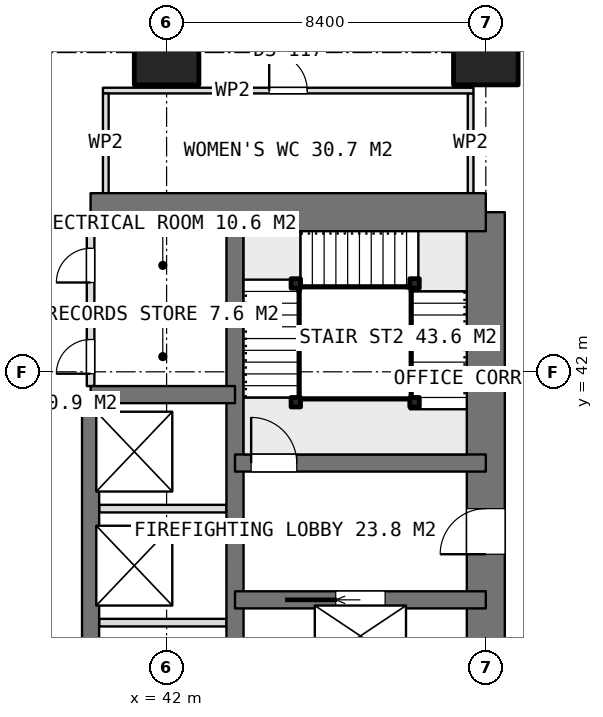
"""IFC4 building model, lengths in metres.
Left out: names, types, materials, properties, quantities, classifications, styles, units other than length and angle.
Written with IfcOpenShell. Run it as: python <this file> out.ifc"""

import sys

from ifc_helpers import new_model, si_unit, direction, frame, frame_2d, origin, origin_2d, place, context, subcontext, project, spatial, rectangle, extrude, element, fill, save


model = new_model("IFC4")
c1 = context("Model", 3, precision=1e-05, world=origin(), true_north=direction((0.0, 1.0)))
c2 = subcontext(c1, "Body", "Model", "MODEL_VIEW")
j1 = project(units=[si_unit("LENGTHUNIT", "METRE"), si_unit("PLANEANGLEUNIT", "RADIAN")], contexts=[c1])
p1 = place(None, origin())
s1 = spatial("IfcSite", under=j1, at=p1, CompositionType="ELEMENT")
p2 = place(p1, origin())
s2 = spatial("IfcBuilding", under=s1, at=p2, CompositionType="ELEMENT")
p3 = place(p2, frame((0.0, 0.0, 110.3)))
s3 = spatial("IfcBuildingStorey", under=s2, at=p3, CompositionType="ELEMENT", Elevation=110.3)
p4 = place(p3, frame((40.0, 46.2, 0.0), z_axis=(0.0, 0.0, 1.0), x_axis=(1.0, 0.0, 0.0)))
e1 = element("IfcWall", 1, at=p4, inside=s3, PredefinedType="SHEAR", context=c2, shape_type="SweptSolid", body=[
    extrude(rectangle(XDim=10.4, YDim=1.0, at=frame_2d((5.2, 0.0))), origin(), (0.0, 0.0, 1.0), 3.75),
])
p5 = place(p3, frame((50.4, 21.0, 0.0), z_axis=(0.0, 0.0, 1.0), x_axis=(0.0, 1.0, 0.0)))
e2 = element("IfcWall", 2, at=p5, inside=s3, PredefinedType="SHEAR", context=c2, shape_type="SweptSolid", body=[
    extrude(rectangle(XDim=25.2, YDim=1.0, at=frame_2d((12.6, 0.0))), origin(), (0.0, 0.0, 1.0), 3.75),
])
p6 = place(p5, frame((16.2, 0.0, 0.0)))
e3 = element("IfcOpeningElement", 3, at=p6, cuts=e2, PredefinedType="OPENING", context=c2, shape_type="SweptSolid", body=[
    extrude(rectangle(XDim=1.2, YDim=2.1, at=frame_2d((0.6, 1.05))), frame((0.0, 0.51, 0.0), z_axis=(0.0, -1.0, 0.0), x_axis=(1.0, 0.0, 0.0)), (0.0, 0.0, 1.0), 1.02),
])
p7 = place(p5, frame((10.05, 0.0, 0.0)))
e4 = element("IfcOpeningElement", 4, at=p7, cuts=e2, PredefinedType="OPENING", context=c2, shape_type="SweptSolid", body=[
    extrude(rectangle(XDim=0.9, YDim=2.1, at=frame_2d((0.45, 1.05))), frame((0.0, 0.51, 0.0), z_axis=(0.0, -1.0, 0.0), x_axis=(1.0, 0.0, 0.0)), (0.0, 0.0, 1.0), 1.02),
])
p8 = place(p5, frame((7.45, 0.0, 0.0)))
e5 = element("IfcOpeningElement", 5, at=p8, cuts=e2, PredefinedType="OPENING", context=c2, shape_type="SweptSolid", body=[
    extrude(rectangle(XDim=0.9, YDim=2.1, at=frame_2d((0.45, 1.05))), frame((0.0, 0.51, 0.0), z_axis=(0.0, -1.0, 0.0), x_axis=(1.0, 0.0, 0.0)), (0.0, 0.0, 1.0), 1.02),
])
p9 = place(p5, frame((0.7, 0.0, 0.0)))
e6 = element("IfcOpeningElement", 6, at=p9, cuts=e2, PredefinedType="OPENING", context=c2, shape_type="SweptSolid", body=[
    extrude(rectangle(XDim=1.2, YDim=2.1, at=frame_2d((0.6, 1.05))), frame((0.0, 0.51, 0.0), z_axis=(0.0, -1.0, 0.0), x_axis=(1.0, 0.0, 0.0)), (0.0, 0.0, 1.0), 1.02),
])
p10 = place(p3, frame((43.8, 21.0, 0.0), z_axis=(0.0, 0.0, 1.0), x_axis=(0.0, 1.0, 0.0)))
e7 = element("IfcWall", 7, at=p10, inside=s3, PredefinedType="SHEAR", context=c2, shape_type="SweptSolid", body=[
    extrude(rectangle(XDim=25.2, YDim=0.45, at=frame_2d((12.6, 0.0))), origin(), (0.0, 0.0, 1.0), 3.75),
])
p11 = place(p3, frame((40.0, 23.4, 0.0), z_axis=(0.0, 0.0, 1.0), x_axis=(0.0, 1.0, 0.0)))
e8 = element("IfcWall", 8, at=p11, inside=s3, PredefinedType="SHEAR", context=c2, shape_type="SweptSolid", body=[
    extrude(rectangle(XDim=18.0, YDim=0.45, at=frame_2d((9.0, 0.0))), origin(), (0.0, 0.0, 1.0), 3.75),
])
p12 = place(p11, frame((1.7, 0.0, 0.0)))
e9 = element("IfcOpeningElement", 9, at=p12, cuts=e8, PredefinedType="OPENING", context=c2, shape_type="SweptSolid", body=[
    extrude(rectangle(XDim=1.0, YDim=2.1, at=frame_2d((0.5, 1.05))), frame((0.0, 0.235, 0.0), z_axis=(0.0, -1.0, 0.0), x_axis=(1.0, 0.0, 0.0)), (0.0, 0.0, 1.0), 0.47),
])
p13 = place(p11, frame((4.75, 0.0, 0.0)))
e10 = element("IfcOpeningElement", 10, at=p13, cuts=e8, PredefinedType="OPENING", context=c2, shape_type="SweptSolid", body=[
    extrude(rectangle(XDim=0.9, YDim=2.1, at=frame_2d((0.45, 1.05))), frame((0.0, 0.235, 0.0), z_axis=(0.0, -1.0, 0.0), x_axis=(1.0, 0.0, 0.0)), (0.0, 0.0, 1.0), 0.47),
])
p14 = place(p3, frame((40.0, 41.4, 0.0), z_axis=(0.0, 0.0, 1.0), x_axis=(1.0, 0.0, 0.0)))
e11 = element("IfcWall", 11, at=p14, inside=s3, PredefinedType="SHEAR", context=c2, shape_type="SweptSolid", body=[
    extrude(rectangle(XDim=3.8, YDim=0.45, at=frame_2d((1.9, 0.0))), origin(), (0.0, 0.0, 1.0), 3.75),
])
p15 = place(p3, frame((43.8, 36.0, 0.0), z_axis=(0.0, 0.0, 1.0), x_axis=(1.0, 0.0, 0.0)))
e12 = element("IfcWall", 12, at=p15, inside=s3, PredefinedType="SHEAR", context=c2, shape_type="SweptSolid", body=[
    extrude(rectangle(XDim=6.6, YDim=0.45, at=frame_2d((3.3, 0.0))), origin(), (0.0, 0.0, 1.0), 3.75),
])
p16 = place(p15, frame((2.65, 0.0, 0.0)))
e13 = element("IfcOpeningElement", 13, at=p16, cuts=e12, PredefinedType="OPENING", context=c2, shape_type="SweptSolid", body=[
    extrude(rectangle(XDim=1.3, YDim=2.1, at=frame_2d((0.65, 1.05))), frame((0.0, 0.235, 0.0), z_axis=(0.0, -1.0, 0.0), x_axis=(1.0, 0.0, 0.0)), (0.0, 0.0, 1.0), 0.47),
])
p17 = place(p3, frame((43.8, 39.6, 0.0), z_axis=(0.0, 0.0, 1.0), x_axis=(1.0, 0.0, 0.0)))
e14 = element("IfcWall", 14, at=p17, inside=s3, PredefinedType="SHEAR", context=c2, shape_type="SweptSolid", body=[
    extrude(rectangle(XDim=6.6, YDim=0.45, at=frame_2d((3.3, 0.0))), origin(), (0.0, 0.0, 1.0), 3.75),
])
p18 = place(p17, frame((0.425, 0.0, 0.0)))
e15 = element("IfcOpeningElement", 15, at=p18, cuts=e14, PredefinedType="OPENING", context=c2, shape_type="SweptSolid", body=[
    extrude(rectangle(XDim=1.2, YDim=2.1, at=frame_2d((0.6, 1.05))), frame((0.0, 0.235, 0.0), z_axis=(0.0, -1.0, 0.0), x_axis=(1.0, 0.0, 0.0)), (0.0, 0.0, 1.0), 0.47),
])
for number, where, z_axis, x_axis in (
    (16, (42.0, 50.4, 0.0), (0.0, 0.0, 1.0), (1.0, 0.0, 0.0)),
    (17, (50.4, 50.4, 0.0), (0.0, 0.0, 1.0), (1.0, 0.0, 0.0)),
):
    element("IfcColumn", number, at=place(p3, frame(where, z_axis=z_axis, x_axis=x_axis)), inside=s3, PredefinedType="COLUMN", context=c2, shape_type="SweptSolid", body=[
        extrude(rectangle(XDim=1.7, YDim=1.7, at=origin_2d()), origin(), (0.0, 0.0, 1.0), 3.75),
    ])
for number, where, z_axis, x_axis in (
    (18, (40.225, 35.4, 0.0), (0.0, 0.0, 1.0), (1.0, 0.0, 0.0)),
    (19, (40.225, 38.4, 0.0), (0.0, 0.0, 1.0), (1.0, 0.0, 0.0)),
):
    element("IfcWall", number, at=place(p3, frame(where, z_axis=z_axis, x_axis=x_axis)), inside=s3, PredefinedType="PARTITIONING", context=c2, shape_type="SweptSolid", body=[
        extrude(rectangle(XDim=3.35, YDim=0.2, at=frame_2d((1.675, 0.0))), origin(), (0.0, 0.0, 1.0), 3.5),
    ])
p19 = place(p3, frame((40.0, 41.625, 0.0), z_axis=(0.0, 0.0, 1.0), x_axis=(0.0, 1.0, 0.0)))
e20 = element("IfcWall", 20, at=p19, inside=s3, PredefinedType="PARTITIONING", context=c2, shape_type="SweptSolid", body=[
    extrude(rectangle(XDim=4.075, YDim=0.2, at=frame_2d((2.038, 0.0))), origin(), (0.0, 0.0, 1.0), 3.5),
])
p20 = place(p19, frame((2.725, 0.0, 0.0)))
e21 = element("IfcOpeningElement", 21, at=p20, cuts=e20, PredefinedType="OPENING", context=c2, shape_type="SweptSolid", body=[
    extrude(rectangle(XDim=0.9, YDim=2.1, at=frame_2d((0.45, 1.05))), frame((0.0, 0.11, 0.0), z_axis=(0.0, -1.0, 0.0), x_axis=(1.0, 0.0, 0.0)), (0.0, 0.0, 1.0), 0.22),
])
p21 = place(p19, frame((0.325, 0.0, 0.0)))
e22 = element("IfcOpeningElement", 22, at=p21, cuts=e20, PredefinedType="OPENING", context=c2, shape_type="SweptSolid", body=[
    extrude(rectangle(XDim=0.9, YDim=2.1, at=frame_2d((0.45, 1.05))), frame((0.0, 0.11, 0.0), z_axis=(0.0, -1.0, 0.0), x_axis=(1.0, 0.0, 0.0)), (0.0, 0.0, 1.0), 0.22),
])
p22 = place(p3, frame((40.0, 43.4, 0.0), z_axis=(0.0, 0.0, 1.0), x_axis=(1.0, 0.0, 0.0)))
e23 = element("IfcWall", 23, at=p22, inside=s3, PredefinedType="PARTITIONING", context=c2, shape_type="SweptSolid", body=[
    extrude(rectangle(XDim=3.575, YDim=0.2, at=frame_2d((1.788, 0.0))), origin(), (0.0, 0.0, 1.0), 3.5),
])
p23 = place(p3, frame((40.325, 49.4, 0.0), z_axis=(0.0, 0.0, 1.0), x_axis=(1.0, 0.0, 0.0)))
e24 = element("IfcWall", 24, at=p23, inside=s3, PredefinedType="PARTITIONING", context=c2, shape_type="SweptSolid", body=[
    extrude(rectangle(XDim=9.75, YDim=0.15, at=frame_2d((4.875, 0.0))), origin(), (0.0, 0.0, 1.0), 3.5),
])
p24 = place(p23, frame((4.375, 0.0, 0.0)))
e25 = element("IfcOpeningElement", 25, at=p24, cuts=e24, PredefinedType="OPENING", context=c2, shape_type="SweptSolid", body=[
    extrude(rectangle(XDim=1.0, YDim=2.1, at=frame_2d((0.5, 1.05))), frame((0.0, 0.085, 0.0), z_axis=(0.0, -1.0, 0.0), x_axis=(1.0, 0.0, 0.0)), (0.0, 0.0, 1.0), 0.17),
])
for number, where, z_axis, x_axis in (
    (26, (40.4, 46.7, 0.0), (0.0, 0.0, 1.0), (0.0, 1.0, 0.0)),
    (27, (50.0, 46.7, 0.0), (0.0, 0.0, 1.0), (0.0, 1.0, 0.0)),
):
    element("IfcWall", number, at=place(p3, frame(where, z_axis=z_axis, x_axis=x_axis)), inside=s3, PredefinedType="PARTITIONING", context=c2, shape_type="SweptSolid", body=[
        extrude(rectangle(XDim=2.625, YDim=0.15, at=frame_2d((1.312, 0.0))), origin(), (0.0, 0.0, 1.0), 3.5),
    ])
for number, where, z_axis, x_axis in (
    (28, (45.4, 41.2, 0.0), (0.0, 0.0, 1.0), (1.0, 0.0, 0.0)),
    (29, (45.4, 44.325, 0.0), (0.0, 0.0, 1.0), (1.0, 0.0, 0.0)),
    (30, (48.525, 44.325, 0.0), (0.0, 0.0, 1.0), (1.0, 0.0, 0.0)),
    (31, (48.525, 41.2, 0.0), (0.0, 0.0, 1.0), (1.0, 0.0, 0.0)),
):
    element("IfcColumn", number, at=place(p3, frame(where, z_axis=z_axis, x_axis=x_axis)), inside=s3, PredefinedType="COLUMN", context=c2, shape_type="SweptSolid", body=[
        extrude(rectangle(XDim=0.25, YDim=0.25, at=origin_2d()), origin(), (0.0, 0.0, 1.0), 3.75),
    ])
p25 = place(p6, origin())
e32 = element("IfcDoor", 32, at=p25, inside=s3, OperationType="SINGLE_SWING_LEFT", PredefinedType="DOOR", context=c2, shape_type="SweptSolid", body=[
    extrude(rectangle(XDim=1.2, YDim=2.1, at=frame_2d((0.6, 1.05))), frame((0.0, 0.025, 0.0), z_axis=(0.0, -1.0, 0.0), x_axis=(1.0, 0.0, 0.0)), (0.0, 0.0, 1.0), 0.05),
])
fill(e3, e32)
p26 = place(p20, origin())
e33 = element("IfcDoor", 33, at=p26, inside=s3, OperationType="SINGLE_SWING_LEFT", PredefinedType="DOOR", context=c2, shape_type="SweptSolid", body=[
    extrude(rectangle(XDim=0.9, YDim=2.1, at=frame_2d((0.45, 1.05))), frame((0.0, 0.025, 0.0), z_axis=(0.0, -1.0, 0.0), x_axis=(1.0, 0.0, 0.0)), (0.0, 0.0, 1.0), 0.05),
])
fill(e21, e33)
p27 = place(p21, origin())
e34 = element("IfcDoor", 34, at=p27, inside=s3, OperationType="SINGLE_SWING_LEFT", PredefinedType="DOOR", context=c2, shape_type="SweptSolid", body=[
    extrude(rectangle(XDim=0.9, YDim=2.1, at=frame_2d((0.45, 1.05))), frame((0.0, 0.025, 0.0), z_axis=(0.0, -1.0, 0.0), x_axis=(1.0, 0.0, 0.0)), (0.0, 0.0, 1.0), 0.05),
])
fill(e22, e34)
p28 = place(p16, origin())
e35 = element("IfcDoor", 35, at=p28, inside=s3, OperationType="SLIDING_TO_LEFT", PredefinedType="USERDEFINED", context=c2, shape_type="SweptSolid", body=[
    extrude(rectangle(XDim=1.3, YDim=2.1, at=frame_2d((0.65, 1.05))), frame((0.0, 0.025, 0.0), z_axis=(0.0, -1.0, 0.0), x_axis=(1.0, 0.0, 0.0)), (0.0, 0.0, 1.0), 0.05),
])
fill(e13, e35)
p29 = place(p24, origin())
e36 = element("IfcDoor", 36, at=p29, inside=s3, OperationType="SINGLE_SWING_LEFT", PredefinedType="DOOR", context=c2, shape_type="SweptSolid", body=[
    extrude(rectangle(XDim=1.0, YDim=2.1, at=frame_2d((0.5, 1.05))), frame((0.0, 0.025, 0.0), z_axis=(0.0, -1.0, 0.0), x_axis=(1.0, 0.0, 0.0)), (0.0, 0.0, 1.0), 0.05),
])
fill(e25, e36)
p30 = place(p18, origin())
e37 = element("IfcDoor", 37, at=p30, inside=s3, OperationType="SINGLE_SWING_RIGHT", PredefinedType="DOOR", context=c2, shape_type="SweptSolid", body=[
    extrude(rectangle(XDim=1.2, YDim=2.1, at=frame_2d((0.6, 1.05))), frame((0.0, 0.025, 0.0), z_axis=(0.0, -1.0, 0.0), x_axis=(1.0, 0.0, 0.0)), (0.0, 0.0, 1.0), 0.05),
])
fill(e15, e37)
save(model, sys.argv[1])
